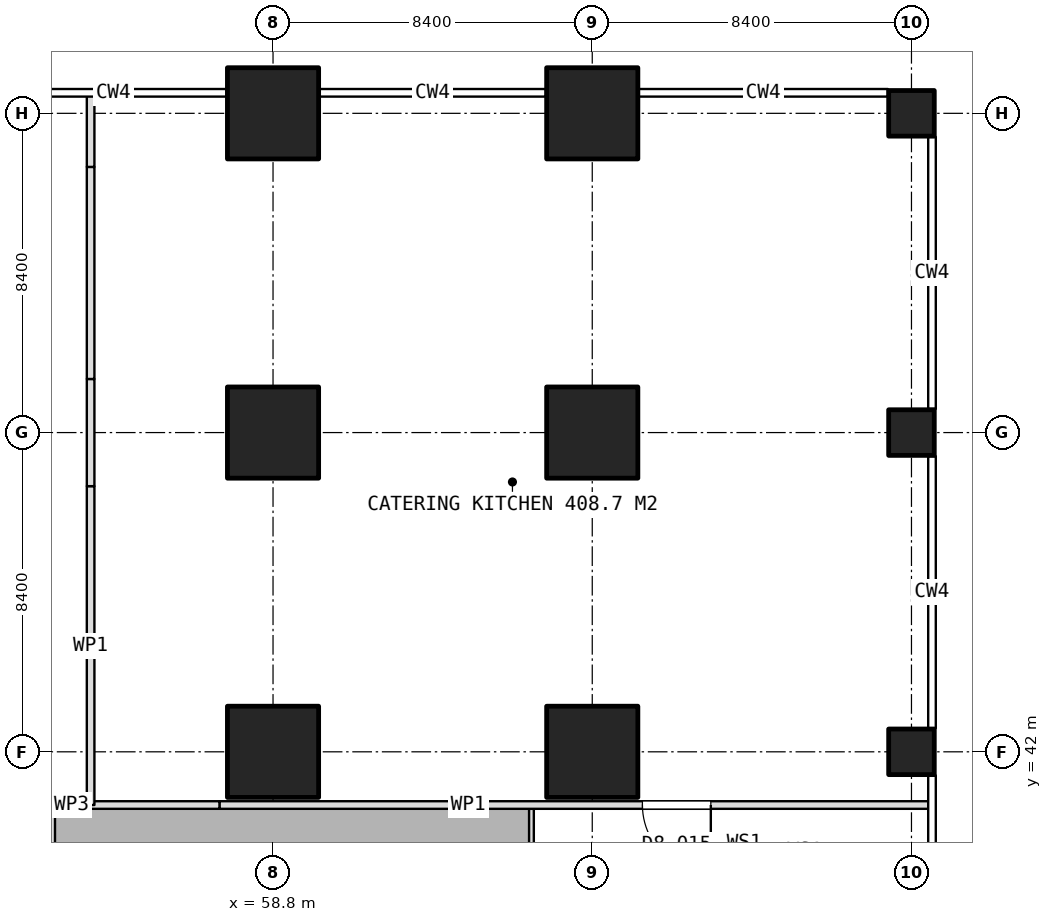
"""IFC4 building model, lengths in metres.
Left out: names, types, materials, properties, quantities, classifications, styles, units other than length and angle.
Written with IfcOpenShell. Run it as: python <this file> out.ifc"""

import sys

from ifc_helpers import new_model, si_unit, direction, frame, frame_2d, origin, origin_2d, place, context, subcontext, project, spatial, rectangle, extrude, element, fill, save


model = new_model("IFC4")
c1 = context("Model", 3, precision=1e-05, world=origin(), true_north=direction((0.0, 1.0)))
c2 = subcontext(c1, "Body", "Model", "MODEL_VIEW")
j1 = project(units=[si_unit("LENGTHUNIT", "METRE"), si_unit("PLANEANGLEUNIT", "RADIAN")], contexts=[c1])
p1 = place(None, origin())
s1 = spatial("IfcSite", under=j1, at=p1, CompositionType="ELEMENT")
p2 = place(p1, origin())
s2 = spatial("IfcBuilding", under=s1, at=p2, CompositionType="ELEMENT")
p3 = place(p2, frame((0.0, 0.0, 20.4)))
s3 = spatial("IfcBuildingStorey", under=s2, at=p3, CompositionType="ELEMENT", Elevation=20.4)
for number, where, z_axis, x_axis in (
    (1, (58.8, 42.0, 0.0), (0.0, 0.0, 1.0), (1.0, 0.0, 0.0)),
    (2, (58.8, 50.4, 0.0), (0.0, 0.0, 1.0), (1.0, 0.0, 0.0)),
    (3, (58.8, 58.8, 0.0), (0.0, 0.0, 1.0), (1.0, 0.0, 0.0)),
    (4, (67.2, 42.0, 0.0), (0.0, 0.0, 1.0), (1.0, 0.0, 0.0)),
    (5, (67.2, 50.4, 0.0), (0.0, 0.0, 1.0), (1.0, 0.0, 0.0)),
    (6, (67.2, 58.8, 0.0), (0.0, 0.0, 1.0), (1.0, 0.0, 0.0)),
):
    element("IfcColumn", number, at=place(p3, frame(where, z_axis=z_axis, x_axis=x_axis)), inside=s3, PredefinedType="COLUMN", context=c2, shape_type="SweptSolid", body=[
        extrude(rectangle(XDim=2.4, YDim=2.4, at=origin_2d()), origin(), (0.0, 0.0, 1.0), 5.0),
    ])
for number, where, z_axis, x_axis in (
    (7, (75.6, 42.0, 0.0), (0.0, 0.0, 1.0), (1.0, 0.0, 0.0)),
    (8, (75.6, 50.4, 0.0), (0.0, 0.0, 1.0), (1.0, 0.0, 0.0)),
    (9, (75.6, 58.8, 0.0), (0.0, 0.0, 1.0), (1.0, 0.0, 0.0)),
):
    element("IfcColumn", number, at=place(p3, frame(where, z_axis=z_axis, x_axis=x_axis)), inside=s3, PredefinedType="COLUMN", context=c2, shape_type="SweptSolid", body=[
        extrude(rectangle(XDim=1.2, YDim=1.2, at=origin_2d()), origin(), (0.0, 0.0, 1.0), 5.0),
    ])
p4 = place(p3, frame((76.09, 40.6, 0.0), z_axis=(0.0, 0.0, 1.0), x_axis=(-1.0, 0.0, 0.0)))
e10 = element("IfcWall", 10, at=p4, inside=s3, PredefinedType="PARTITIONING", context=c2, shape_type="SweptSolid", body=[
    extrude(rectangle(XDim=18.7, YDim=0.2, at=frame_2d((9.35, 0.0))), origin(), (0.0, 0.0, 1.0), 2.8),
])
p5 = place(p4, frame((5.77, 0.0, 0.0)))
e11 = element("IfcOpeningElement", 11, at=p5, cuts=e10, PredefinedType="OPENING", context=c2, shape_type="SweptSolid", body=[
    extrude(rectangle(XDim=1.8, YDim=2.1, at=frame_2d((0.9, 1.05))), frame((0.0, 0.11, 0.0), z_axis=(0.0, -1.0, 0.0), x_axis=(1.0, 0.0, 0.0)), (0.0, 0.0, 1.0), 0.22),
])
p6 = place(p3, frame((57.39, 40.6, 0.0), z_axis=(0.0, 0.0, 1.0), x_axis=(-1.0, 0.0, 0.0)))
e12 = element("IfcWall", 12, at=p6, inside=s3, PredefinedType="PARTITIONING", context=c2, shape_type="SweptSolid", body=[
    extrude(rectangle(XDim=3.39, YDim=0.2, at=frame_2d((1.695, 0.0))), origin(), (0.0, 0.0, 1.0), 4.6),
])
p7 = place(p3, frame((54.0, 40.6, 0.0), z_axis=(0.0, 0.0, 1.0), x_axis=(0.0, 1.0, 0.0)))
e13 = element("IfcWall", 13, at=p7, inside=s3, PredefinedType="PARTITIONING", context=c2, shape_type="SweptSolid", body=[
    extrude(rectangle(XDim=8.39, YDim=0.2, at=frame_2d((4.195, 0.0))), origin(), (0.0, 0.0, 1.0), 4.6),
])
p8 = place(p3, frame((54.0, 48.99, 0.0), z_axis=(0.0, 0.0, 1.0), x_axis=(0.0, 1.0, 0.0)))
e14 = element("IfcWall", 14, at=p8, inside=s3, PredefinedType="PARTITIONING", context=c2, shape_type="SweptSolid", body=[
    extrude(rectangle(XDim=2.82, YDim=0.2, at=frame_2d((1.41, 0.0))), origin(), (0.0, 0.0, 1.0), 2.8),
])
p9 = place(p3, frame((54.0, 51.81, 0.0), z_axis=(0.0, 0.0, 1.0), x_axis=(0.0, 1.0, 0.0)))
e15 = element("IfcWall", 15, at=p9, inside=s3, PredefinedType="PARTITIONING", context=c2, shape_type="SweptSolid", body=[
    extrude(rectangle(XDim=5.58, YDim=0.2, at=frame_2d((2.79, 0.0))), origin(), (0.0, 0.0, 1.0), 4.6),
])
p10 = place(p3, frame((54.0, 57.39, 0.0), z_axis=(0.0, 0.0, 1.0), x_axis=(0.0, 1.0, 0.0)))
e16 = element("IfcWall", 16, at=p10, inside=s3, PredefinedType="PARTITIONING", context=c2, shape_type="SweptSolid", body=[
    extrude(rectangle(XDim=1.9, YDim=0.2, at=frame_2d((0.95, 0.0))), origin(), (0.0, 0.0, 1.0), 2.8),
])
p11 = place(p3, frame((53.0, 30.8, 0.0), z_axis=(0.0, 0.0, 1.0), x_axis=(0.0, 1.0, 0.0)))
e17 = element("IfcWall", 17, at=p11, inside=s3, PredefinedType="PARTITIONING", context=c2, shape_type="SweptSolid", body=[
    extrude(rectangle(XDim=9.8, YDim=0.125, at=frame_2d((4.9, 0.0))), origin(), (0.0, 0.0, 1.0), 4.6),
])
p12 = place(p11, frame((4.4, 0.0, 0.0)))
e18 = element("IfcOpeningElement", 18, at=p12, cuts=e17, PredefinedType="OPENING", context=c2, shape_type="SweptSolid", body=[
    extrude(rectangle(XDim=1.0, YDim=2.1, at=frame_2d((0.5, 1.05))), frame((0.0, 0.073, 0.0), z_axis=(0.0, -1.0, 0.0), x_axis=(1.0, 0.0, 0.0)), (0.0, 0.0, 1.0), 0.145),
])
p13 = place(p3, frame((53.0, 40.6, 0.0), z_axis=(0.0, 0.0, 1.0), x_axis=(1.0, 0.0, 0.0)))
e19 = element("IfcWall", 19, at=p13, inside=s3, PredefinedType="PARTITIONING", context=c2, shape_type="SweptSolid", body=[
    extrude(rectangle(XDim=1.0, YDim=0.125, at=frame_2d((0.5, 0.0))), origin(), (0.0, 0.0, 1.0), 4.6),
])
p14 = place(p3, frame((65.6, 40.5, 0.0), z_axis=(0.0, 0.0, 1.0), x_axis=(0.0, -1.0, 0.0)))
e20 = element("IfcWall", 20, at=p14, inside=s3, PredefinedType="PARTITIONING", context=c2, shape_type="SweptSolid", body=[
    extrude(rectangle(XDim=5.49, YDim=0.125, at=frame_2d((2.745, 0.0))), origin(), (0.0, 0.0, 1.0), 2.8),
])
p15 = place(p5, origin())
e21 = element("IfcDoor", 21, at=p15, inside=s3, OperationType="DOUBLE_DOOR_SINGLE_SWING", PredefinedType="DOOR", context=c2, shape_type="SweptSolid", body=[
    extrude(rectangle(XDim=1.8, YDim=2.1, at=frame_2d((0.9, 1.05))), frame((0.0, 0.025, 0.0), z_axis=(0.0, -1.0, 0.0), x_axis=(1.0, 0.0, 0.0)), (0.0, 0.0, 1.0), 0.05),
])
fill(e11, e21)
save(model, sys.argv[1])
